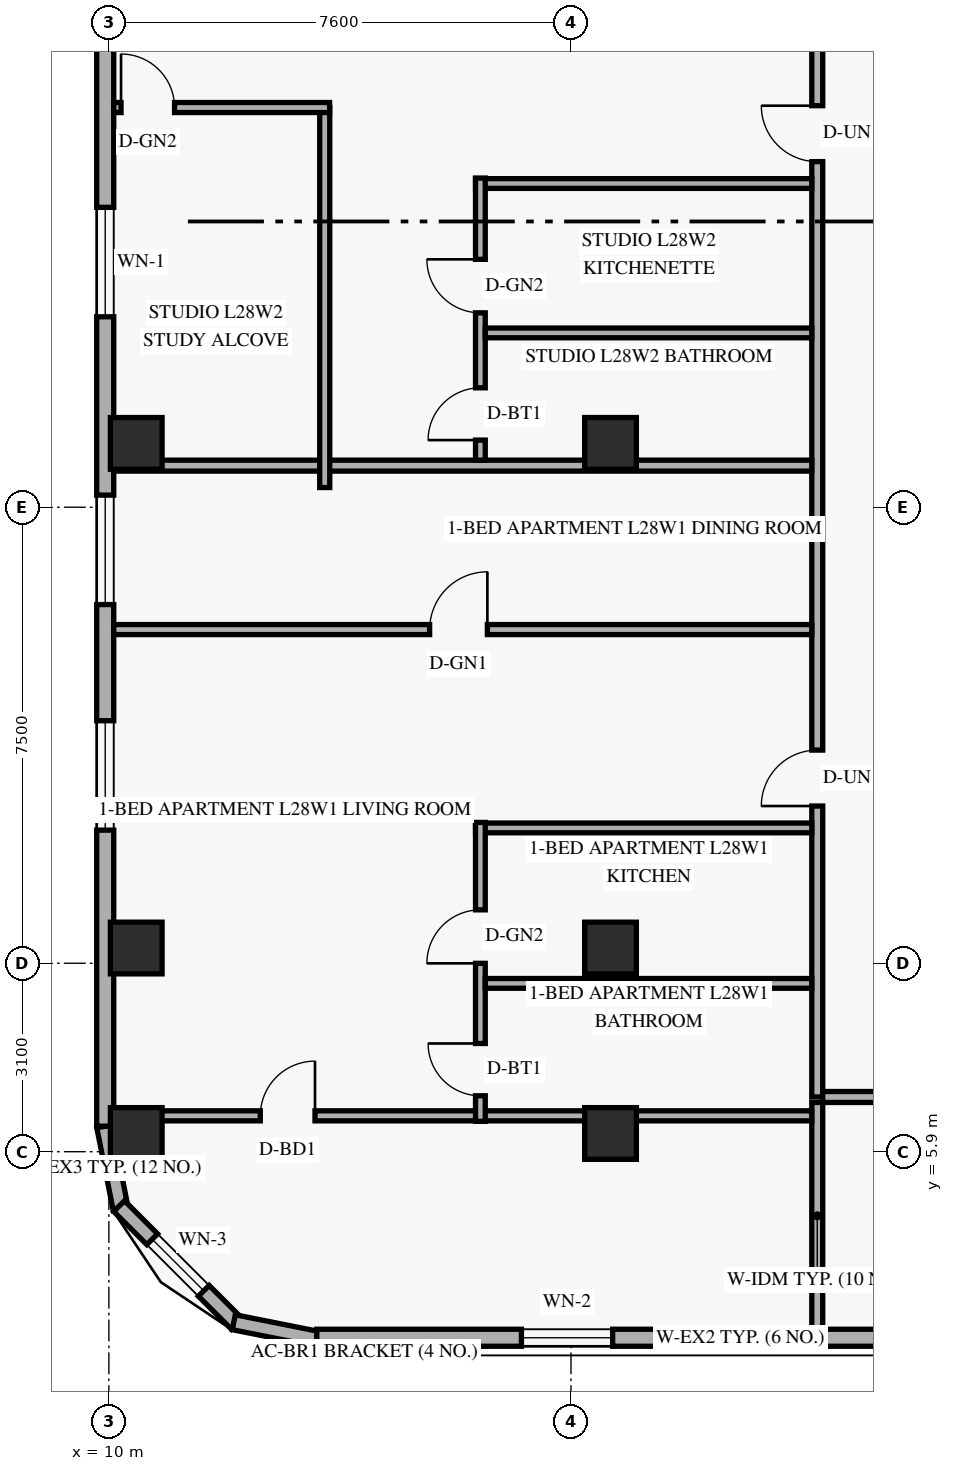
"""IFC4 building model, lengths in metres.
Left out: names, types, materials, properties, quantities, classifications, styles, units other than length and angle.
Written with IfcOpenShell. Run it as: python <this file> out.ifc"""

import sys

from ifc_helpers import new_model, si_unit, direction, frame, frame_2d, origin, origin_2d, place, context, subcontext, project, spatial, rectangle, extrude, element, fill, save


model = new_model("IFC4")
c1 = context("Model", 3, precision=1e-05, world=origin(), true_north=direction((0.0, 1.0)))
c2 = subcontext(c1, "Body", "Model", "MODEL_VIEW")
j1 = project(units=[si_unit("LENGTHUNIT", "METRE"), si_unit("PLANEANGLEUNIT", "RADIAN")], contexts=[c1])
p1 = place(None, origin())
s1 = spatial("IfcSite", under=j1, at=p1, CompositionType="ELEMENT")
p2 = place(p1, origin())
s2 = spatial("IfcBuilding", under=s1, at=p2, CompositionType="ELEMENT")
p3 = place(p2, frame((0.0, 0.0, 109.8)))
s3 = spatial("IfcBuildingStorey", under=s2, at=p3, CompositionType="ELEMENT", Elevation=109.8)
for number, where, z_axis, x_axis in (
    (1, (10.45, 6.2, 0.0), (0.0, 0.0, 1.0), (1.0, 0.0, 0.0)),
    (2, (10.45, 9.25, 0.0), (0.0, 0.0, 1.0), (1.0, 0.0, 0.0)),
    (3, (10.45, 17.55, 0.0), (0.0, 0.0, 1.0), (1.0, 0.0, 0.0)),
    (4, (18.25, 6.2, 0.0), (0.0, 0.0, 1.0), (1.0, 0.0, 0.0)),
    (5, (18.25, 9.25, 0.0), (0.0, 0.0, 1.0), (1.0, 0.0, 0.0)),
    (6, (18.25, 17.55, 0.0), (0.0, 0.0, 1.0), (1.0, 0.0, 0.0)),
):
    element("IfcColumn", number, at=place(p3, frame(where, z_axis=z_axis, x_axis=x_axis)), inside=s3, PredefinedType="COLUMN", context=c2, shape_type="SweptSolid", body=[
        extrude(rectangle(XDim=0.85, YDim=0.85, at=origin_2d()), origin(), (0.0, 0.0, 1.0), 3.6),
    ])
p4 = place(p3, frame((9.924, 6.316, 0.0), z_axis=(0.0, 0.0, 1.0), x_axis=(0.195000137217, -0.980803214965, 0.0)))
e7 = element("IfcWall", 7, at=p4, inside=s3, PredefinedType="SOLIDWALL", context=c2, shape_type="SweptSolid", body=[
    extrude(rectangle(XDim=1.388, YDim=0.25, at=frame_2d((0.694, 0.0))), origin(), (0.0, 0.0, 1.0), 3.36),
])
p5 = place(p3, frame((10.168, 5.005, 0.0), z_axis=(0.0, 0.0, 1.0), x_axis=(0.707151344399, -0.707062215165, 0.0)))
e8 = element("IfcWall", 8, at=p5, inside=s3, PredefinedType="SOLIDWALL", context=c2, shape_type="SweptSolid", body=[
    extrude(rectangle(XDim=2.739, YDim=0.25, at=frame_2d((1.37, 0.0))), origin(), (0.0, 0.0, 1.0), 3.36),
])
p6 = place(p5, frame((0.77, 0.0, 0.85)))
e9 = element("IfcOpeningElement", 9, at=p6, cuts=e8, PredefinedType="OPENING", context=c2, shape_type="SweptSolid", body=[
    extrude(rectangle(XDim=1.2, YDim=1.5, at=frame_2d((0.6, 0.75))), frame((0.0, 0.135, 0.0), z_axis=(0.0, -1.0, 0.0), x_axis=(1.0, 0.0, 0.0)), (0.0, 0.0, 1.0), 0.27),
])
p7 = place(p3, frame((12.054, 3.095, 0.0), z_axis=(0.0, 0.0, 1.0), x_axis=(0.980809899341, -0.19496651342, 0.0)))
e10 = element("IfcWall", 10, at=p7, inside=s3, PredefinedType="SOLIDWALL", context=c2, shape_type="SweptSolid", body=[
    extrude(rectangle(XDim=1.389, YDim=0.25, at=frame_2d((0.694, 0.0))), origin(), (0.0, 0.0, 1.0), 3.36),
])
p8 = place(p3, frame((13.42, 2.84, 0.0), z_axis=(0.0, 0.0, 1.0), x_axis=(1.0, 0.0, 0.0)))
e11 = element("IfcWall", 11, at=p8, inside=s3, PredefinedType="SOLIDWALL", context=c2, shape_type="SweptSolid", body=[
    extrude(rectangle(XDim=13.93, YDim=0.28, at=frame_2d((6.965, 0.0))), origin(), (0.0, 0.0, 1.0), 3.36),
])
p9 = place(p8, frame((3.365, 0.0, 0.85)))
e12 = element("IfcOpeningElement", 12, at=p9, cuts=e11, PredefinedType="OPENING", context=c2, shape_type="SweptSolid", body=[
    extrude(rectangle(XDim=1.5, YDim=1.55, at=frame_2d((0.75, 0.775))), frame((0.0, 0.15, 0.0), z_axis=(0.0, -1.0, 0.0), x_axis=(1.0, 0.0, 0.0)), (0.0, 0.0, 1.0), 0.3),
])
p10 = place(p8, frame((10.33, 0.0, 0.85)))
e13 = element("IfcOpeningElement", 13, at=p10, cuts=e11, PredefinedType="OPENING", context=c2, shape_type="SweptSolid", body=[
    extrude(rectangle(XDim=1.5, YDim=1.55, at=frame_2d((0.75, 0.775))), frame((0.0, 0.15, 0.0), z_axis=(0.0, -1.0, 0.0), x_axis=(1.0, 0.0, 0.0)), (0.0, 0.0, 1.0), 0.3),
])
p11 = place(p3, frame((9.94, 41.68, 0.0), z_axis=(0.0, 0.0, 1.0), x_axis=(0.0, -1.0, 0.0)))
e14 = element("IfcWall", 14, at=p11, inside=s3, PredefinedType="SOLIDWALL", context=c2, shape_type="SweptSolid", body=[
    extrude(rectangle(XDim=35.36, YDim=0.28, at=frame_2d((17.68, 0.0))), origin(), (0.0, 0.0, 1.0), 3.36),
])
p12 = place(p11, frame((28.691, 0.0, 0.85)))
e15 = element("IfcOpeningElement", 15, at=p12, cuts=e14, PredefinedType="OPENING", context=c2, shape_type="SweptSolid", body=[
    extrude(rectangle(XDim=1.8, YDim=1.6, at=frame_2d((0.9, 0.8))), frame((0.0, 0.15, 0.0), z_axis=(0.0, -1.0, 0.0), x_axis=(1.0, 0.0, 0.0)), (0.0, 0.0, 1.0), 0.3),
])
p13 = place(p11, frame((24.981, 0.0, 0.85)))
e16 = element("IfcOpeningElement", 16, at=p13, cuts=e14, PredefinedType="OPENING", context=c2, shape_type="SweptSolid", body=[
    extrude(rectangle(XDim=1.8, YDim=1.6, at=frame_2d((0.9, 0.8))), frame((0.0, 0.15, 0.0), z_axis=(0.0, -1.0, 0.0), x_axis=(1.0, 0.0, 0.0)), (0.0, 0.0, 1.0), 0.3),
])
p14 = place(p11, frame((20.248, 0.0, 0.85)))
e17 = element("IfcOpeningElement", 17, at=p14, cuts=e14, PredefinedType="OPENING", context=c2, shape_type="SweptSolid", body=[
    extrude(rectangle(XDim=1.8, YDim=1.6, at=frame_2d((0.9, 0.8))), frame((0.0, 0.15, 0.0), z_axis=(0.0, -1.0, 0.0), x_axis=(1.0, 0.0, 0.0)), (0.0, 0.0, 1.0), 0.3),
])
p15 = place(p11, frame((14.363, 0.0, 0.85)))
e18 = element("IfcOpeningElement", 18, at=p15, cuts=e14, PredefinedType="OPENING", context=c2, shape_type="SweptSolid", body=[
    extrude(rectangle(XDim=1.8, YDim=1.6, at=frame_2d((0.9, 0.8))), frame((0.0, 0.15, 0.0), z_axis=(0.0, -1.0, 0.0), x_axis=(1.0, 0.0, 0.0)), (0.0, 0.0, 1.0), 0.3),
])
p16 = place(p11, frame((7.867, 0.0, 0.85)))
e19 = element("IfcOpeningElement", 19, at=p16, cuts=e14, PredefinedType="OPENING", context=c2, shape_type="SweptSolid", body=[
    extrude(rectangle(XDim=1.8, YDim=1.6, at=frame_2d((0.9, 0.8))), frame((0.0, 0.15, 0.0), z_axis=(0.0, -1.0, 0.0), x_axis=(1.0, 0.0, 0.0)), (0.0, 0.0, 1.0), 0.3),
])
p17 = place(p11, frame((4.546, 0.0, 0.85)))
e20 = element("IfcOpeningElement", 20, at=p17, cuts=e14, PredefinedType="OPENING", context=c2, shape_type="SweptSolid", body=[
    extrude(rectangle(XDim=1.8, YDim=1.6, at=frame_2d((0.9, 0.8))), frame((0.0, 0.15, 0.0), z_axis=(0.0, -1.0, 0.0), x_axis=(1.0, 0.0, 0.0)), (0.0, 0.0, 1.0), 0.3),
])
p18 = place(p3, frame((21.65, 6.8, 0.0), z_axis=(0.0, 0.0, 1.0), x_axis=(0.0, 1.0, 0.0)))
e21 = element("IfcWall", 21, at=p18, inside=s3, PredefinedType="STANDARD", context=c2, shape_type="SweptSolid", body=[
    extrude(rectangle(XDim=34.4, YDim=0.18, at=frame_2d((17.2, 0.0))), origin(), (0.0, 0.0, 1.0), 2.731),
])
p19 = place(p18, frame((4.785, 0.0, 0.0)))
e22 = element("IfcOpeningElement", 22, at=p19, cuts=e21, PredefinedType="OPENING", context=c2, shape_type="SweptSolid", body=[
    extrude(rectangle(XDim=0.92, YDim=2.15, at=frame_2d((0.46, 1.075))), frame((0.0, 0.1, 0.0), z_axis=(0.0, -1.0, 0.0), x_axis=(1.0, 0.0, 0.0)), (0.0, 0.0, 1.0), 0.2),
])
p20 = place(p18, frame((15.384, 0.0, 0.0)))
e23 = element("IfcOpeningElement", 23, at=p20, cuts=e21, PredefinedType="OPENING", context=c2, shape_type="SweptSolid", body=[
    extrude(rectangle(XDim=0.92, YDim=2.15, at=frame_2d((0.46, 1.075))), frame((0.0, 0.1, 0.0), z_axis=(0.0, -1.0, 0.0), x_axis=(1.0, 0.0, 0.0)), (0.0, 0.0, 1.0), 0.2),
])
p21 = place(p18, frame((28.41, 0.0, 0.0)))
e24 = element("IfcOpeningElement", 24, at=p21, cuts=e21, PredefinedType="OPENING", context=c2, shape_type="SweptSolid", body=[
    extrude(rectangle(XDim=0.92, YDim=2.15, at=frame_2d((0.46, 1.075))), frame((0.0, 0.1, 0.0), z_axis=(0.0, -1.0, 0.0), x_axis=(1.0, 0.0, 0.0)), (0.0, 0.0, 1.0), 0.2),
])
p22 = place(p3, frame((21.74, 6.8, 0.0), z_axis=(0.0, 0.0, 1.0), x_axis=(1.0, 0.0, 0.0)))
e25 = element("IfcWall", 25, at=p22, inside=s3, PredefinedType="STANDARD", context=c2, shape_type="SweptSolid", body=[
    extrude(rectangle(XDim=13.68, YDim=0.18, at=frame_2d((6.84, 0.0))), origin(), (0.0, 0.0, 1.0), 2.731),
])
p23 = place(p22, frame((0.97, 0.0, 0.0)))
e26 = element("IfcOpeningElement", 26, at=p23, cuts=e25, PredefinedType="OPENING", context=c2, shape_type="SweptSolid", body=[
    extrude(rectangle(XDim=0.95, YDim=2.15, at=frame_2d((0.475, 1.075))), frame((0.0, 0.1, 0.0), z_axis=(0.0, -1.0, 0.0), x_axis=(1.0, 0.0, 0.0)), (0.0, 0.0, 1.0), 0.2),
])
p24 = place(p22, frame((9.11, 0.0, 0.0)))
e27 = element("IfcOpeningElement", 27, at=p24, cuts=e25, PredefinedType="OPENING", context=c2, shape_type="SweptSolid", body=[
    extrude(rectangle(XDim=0.95, YDim=2.15, at=frame_2d((0.475, 1.075))), frame((0.0, 0.1, 0.0), z_axis=(0.0, -1.0, 0.0), x_axis=(1.0, 0.0, 0.0)), (0.0, 0.0, 1.0), 0.2),
])
p25 = place(p3, frame((21.65, 2.98, 0.0), z_axis=(0.0, 0.0, 1.0), x_axis=(0.0, 1.0, 0.0)))
e28 = element("IfcWall", 28, at=p25, inside=s3, PredefinedType="PARTITIONING", context=c2, shape_type="SweptSolid", body=[
    extrude(rectangle(XDim=3.73, YDim=0.18, at=frame_2d((1.865, 0.0))), origin(), (0.0, 0.0, 1.0), 2.809),
])
p26 = place(p3, frame((10.08, 6.49, 0.0), z_axis=(0.0, 0.0, 1.0), x_axis=(1.0, 0.0, 0.0)))
e29 = element("IfcWall", 29, at=p26, inside=s3, PredefinedType="PARTITIONING", context=c2, shape_type="SweptSolid", body=[
    extrude(rectangle(XDim=11.48, YDim=0.165, at=frame_2d((5.74, 0.0))), origin(), (0.0, 0.0, 1.0), 3.36),
])
p27 = place(p26, frame((2.41, 0.0, 0.0)))
e30 = element("IfcOpeningElement", 30, at=p27, cuts=e29, PredefinedType="OPENING", context=c2, shape_type="SweptSolid", body=[
    extrude(rectangle(XDim=0.9, YDim=2.14, at=frame_2d((0.45, 1.07))), frame((0.0, 0.093, 0.0), z_axis=(0.0, -1.0, 0.0), x_axis=(1.0, 0.0, 0.0)), (0.0, 0.0, 1.0), 0.185),
])
p28 = place(p3, frame((16.03, 11.226, 0.0), z_axis=(0.0, 0.0, 1.0), x_axis=(1.0, 0.0, 0.0)))
e31 = element("IfcWall", 31, at=p28, inside=s3, PredefinedType="PLUMBINGWALL", context=c2, shape_type="SweptSolid", body=[
    extrude(rectangle(XDim=5.53, YDim=0.16, at=frame_2d((2.765, 0.0))), origin(), (0.0, 0.0, 1.0), 2.731),
])
p29 = place(p3, frame((16.11, 6.4, 0.0), z_axis=(0.0, 0.0, 1.0), x_axis=(0.0, 1.0, 0.0)))
e32 = element("IfcWall", 32, at=p29, inside=s3, PredefinedType="PLUMBINGWALL", context=c2, shape_type="SweptSolid", body=[
    extrude(rectangle(XDim=4.916, YDim=0.16, at=frame_2d((2.458, 0.0))), origin(), (0.0, 0.0, 1.0), 2.731),
])
p30 = place(p29, frame((0.42, 0.0, 0.0)))
e33 = element("IfcOpeningElement", 33, at=p30, cuts=e32, PredefinedType="OPENING", context=c2, shape_type="SweptSolid", body=[
    extrude(rectangle(XDim=0.86, YDim=2.12, at=frame_2d((0.43, 1.06))), frame((0.0, 0.09, 0.0), z_axis=(0.0, -1.0, 0.0), x_axis=(1.0, 0.0, 0.0)), (0.0, 0.0, 1.0), 0.18),
])
p31 = place(p29, frame((2.598, 0.0, 0.0)))
e34 = element("IfcOpeningElement", 34, at=p31, cuts=e32, PredefinedType="OPENING", context=c2, shape_type="SweptSolid", body=[
    extrude(rectangle(XDim=0.88, YDim=2.12, at=frame_2d((0.44, 1.06))), frame((0.0, 0.09, 0.0), z_axis=(0.0, -1.0, 0.0), x_axis=(1.0, 0.0, 0.0)), (0.0, 0.0, 1.0), 0.18),
])
p32 = place(p3, frame((16.19, 8.668, 0.0), z_axis=(0.0, 0.0, 1.0), x_axis=(1.0, 0.0, 0.0)))
e35 = element("IfcWall", 35, at=p32, inside=s3, PredefinedType="PLUMBINGWALL", context=c2, shape_type="SweptSolid", body=[
    extrude(rectangle(XDim=5.37, YDim=0.16, at=frame_2d((2.685, 0.0))), origin(), (0.0, 0.0, 1.0), 2.731),
])
p33 = place(p3, frame((10.08, 14.488, 0.0), z_axis=(0.0, 0.0, 1.0), x_axis=(1.0, 0.0, 0.0)))
e36 = element("IfcWall", 36, at=p33, inside=s3, PredefinedType="PARTITIONING", context=c2, shape_type="SweptSolid", body=[
    extrude(rectangle(XDim=11.48, YDim=0.165, at=frame_2d((5.74, 0.0))), origin(), (0.0, 0.0, 1.0), 2.731),
])
p34 = place(p33, frame((5.195, 0.0, 0.0)))
e37 = element("IfcOpeningElement", 37, at=p34, cuts=e36, PredefinedType="OPENING", context=c2, shape_type="SweptSolid", body=[
    extrude(rectangle(XDim=0.95, YDim=2.15, at=frame_2d((0.475, 1.075))), frame((0.0, 0.093, 0.0), z_axis=(0.0, -1.0, 0.0), x_axis=(1.0, 0.0, 0.0)), (0.0, 0.0, 1.0), 0.185),
])
p35 = place(p3, frame((10.08, 17.184, 0.0), z_axis=(0.0, 0.0, 1.0), x_axis=(1.0, 0.0, 0.0)))
e38 = element("IfcWall", 38, at=p35, inside=s3, PredefinedType="PARTITIONING", context=c2, shape_type="SweptSolid", body=[
    extrude(rectangle(XDim=11.48, YDim=0.18, at=frame_2d((5.74, 0.0))), origin(), (0.0, 0.0, 1.0), 2.731),
])
p36 = place(p3, frame((16.03, 21.824, 0.0), z_axis=(0.0, 0.0, 1.0), x_axis=(1.0, 0.0, 0.0)))
e39 = element("IfcWall", 39, at=p36, inside=s3, PredefinedType="PLUMBINGWALL", context=c2, shape_type="SweptSolid", body=[
    extrude(rectangle(XDim=5.53, YDim=0.16, at=frame_2d((2.765, 0.0))), origin(), (0.0, 0.0, 1.0), 2.731),
])
p37 = place(p3, frame((16.11, 17.274, 0.0), z_axis=(0.0, 0.0, 1.0), x_axis=(0.0, 1.0, 0.0)))
e40 = element("IfcWall", 40, at=p37, inside=s3, PredefinedType="PLUMBINGWALL", context=c2, shape_type="SweptSolid", body=[
    extrude(rectangle(XDim=4.64, YDim=0.16, at=frame_2d((2.32, 0.0))), origin(), (0.0, 0.0, 1.0), 2.731),
])
p38 = place(p37, frame((0.33, 0.0, 0.0)))
e41 = element("IfcOpeningElement", 41, at=p38, cuts=e40, PredefinedType="OPENING", context=c2, shape_type="SweptSolid", body=[
    extrude(rectangle(XDim=0.86, YDim=2.12, at=frame_2d((0.43, 1.06))), frame((0.0, 0.09, 0.0), z_axis=(0.0, -1.0, 0.0), x_axis=(1.0, 0.0, 0.0)), (0.0, 0.0, 1.0), 0.18),
])
p39 = place(p37, frame((2.423, 0.0, 0.0)))
e42 = element("IfcOpeningElement", 42, at=p39, cuts=e40, PredefinedType="OPENING", context=c2, shape_type="SweptSolid", body=[
    extrude(rectangle(XDim=0.88, YDim=2.12, at=frame_2d((0.44, 1.06))), frame((0.0, 0.09, 0.0), z_axis=(0.0, -1.0, 0.0), x_axis=(1.0, 0.0, 0.0)), (0.0, 0.0, 1.0), 0.18),
])
p40 = place(p3, frame((16.19, 19.367, 0.0), z_axis=(0.0, 0.0, 1.0), x_axis=(1.0, 0.0, 0.0)))
e43 = element("IfcWall", 43, at=p40, inside=s3, PredefinedType="PLUMBINGWALL", context=c2, shape_type="SweptSolid", body=[
    extrude(rectangle(XDim=5.37, YDim=0.16, at=frame_2d((2.685, 0.0))), origin(), (0.0, 0.0, 1.0), 2.731),
])
p41 = place(p3, frame((13.55, 16.824, 0.0), z_axis=(0.0, 0.0, 1.0), x_axis=(0.0, 1.0, 0.0)))
e44 = element("IfcWall", 44, at=p41, inside=s3, PredefinedType="PARTITIONING", context=c2, shape_type="SweptSolid", body=[
    extrude(rectangle(XDim=6.25, YDim=0.165, at=frame_2d((3.125, 0.0))), origin(), (0.0, 0.0, 1.0), 2.731),
])
p42 = place(p3, frame((10.08, 23.074, 0.0), z_axis=(0.0, 0.0, 1.0), x_axis=(1.0, 0.0, 0.0)))
e45 = element("IfcWall", 45, at=p42, inside=s3, PredefinedType="PARTITIONING", context=c2, shape_type="SweptSolid", body=[
    extrude(rectangle(XDim=3.55, YDim=0.165, at=frame_2d((1.775, 0.0))), origin(), (0.0, 0.0, 1.0), 2.809),
])
p43 = place(p42, frame((0.12, 0.0, 0.0)))
e46 = element("IfcOpeningElement", 46, at=p43, cuts=e45, PredefinedType="OPENING", context=c2, shape_type="SweptSolid", body=[
    extrude(rectangle(XDim=0.88, YDim=2.12, at=frame_2d((0.44, 1.06))), frame((0.0, 0.093, 0.0), z_axis=(0.0, -1.0, 0.0), x_axis=(1.0, 0.0, 0.0)), (0.0, 0.0, 1.0), 0.185),
])
p44 = place(p6, origin())
e47 = element("IfcWindow", 47, at=p44, inside=s3, PartitioningType="SINGLE_PANEL", PredefinedType="WINDOW", context=c2, shape_type="SweptSolid", body=[
    extrude(rectangle(XDim=1.2, YDim=1.5, at=frame_2d((0.6, 0.75))), frame((0.0, 0.03, 0.0), z_axis=(0.0, -1.0, 0.0), x_axis=(1.0, 0.0, 0.0)), (0.0, 0.0, 1.0), 0.06),
])
fill(e9, e47)
p45 = place(p9, origin())
e48 = element("IfcWindow", 48, at=p45, inside=s3, PartitioningType="SINGLE_PANEL", PredefinedType="WINDOW", context=c2, shape_type="SweptSolid", body=[
    extrude(rectangle(XDim=1.5, YDim=1.55, at=frame_2d((0.75, 0.775))), frame((0.0, 0.03, 0.0), z_axis=(0.0, -1.0, 0.0), x_axis=(1.0, 0.0, 0.0)), (0.0, 0.0, 1.0), 0.06),
])
fill(e12, e48)
p46 = place(p12, origin())
e49 = element("IfcWindow", 49, at=p46, inside=s3, PartitioningType="SINGLE_PANEL", PredefinedType="WINDOW", context=c2, shape_type="SweptSolid", body=[
    extrude(rectangle(XDim=1.8, YDim=1.6, at=frame_2d((0.9, 0.8))), frame((0.0, 0.03, 0.0), z_axis=(0.0, -1.0, 0.0), x_axis=(1.0, 0.0, 0.0)), (0.0, 0.0, 1.0), 0.06),
])
fill(e15, e49)
p47 = place(p13, origin())
e50 = element("IfcWindow", 50, at=p47, inside=s3, PartitioningType="SINGLE_PANEL", PredefinedType="WINDOW", context=c2, shape_type="SweptSolid", body=[
    extrude(rectangle(XDim=1.8, YDim=1.6, at=frame_2d((0.9, 0.8))), frame((0.0, 0.03, 0.0), z_axis=(0.0, -1.0, 0.0), x_axis=(1.0, 0.0, 0.0)), (0.0, 0.0, 1.0), 0.06),
])
fill(e16, e50)
p48 = place(p14, origin())
e51 = element("IfcWindow", 51, at=p48, inside=s3, PartitioningType="SINGLE_PANEL", PredefinedType="WINDOW", context=c2, shape_type="SweptSolid", body=[
    extrude(rectangle(XDim=1.8, YDim=1.6, at=frame_2d((0.9, 0.8))), frame((0.0, 0.03, 0.0), z_axis=(0.0, -1.0, 0.0), x_axis=(1.0, 0.0, 0.0)), (0.0, 0.0, 1.0), 0.06),
])
fill(e17, e51)
p49 = place(p34, origin())
e52 = element("IfcDoor", 52, at=p49, inside=s3, OperationType="SINGLE_SWING_RIGHT", PredefinedType="DOOR", context=c2, shape_type="SweptSolid", body=[
    extrude(rectangle(XDim=0.95, YDim=2.15, at=frame_2d((0.475, 1.075))), frame((0.0, 0.025, 0.0), z_axis=(0.0, -1.0, 0.0), x_axis=(1.0, 0.0, 0.0)), (0.0, 0.0, 1.0), 0.05),
])
fill(e37, e52)
p50 = place(p19, origin())
e53 = element("IfcDoor", 53, at=p50, inside=s3, OperationType="SINGLE_SWING_LEFT", PredefinedType="DOOR", context=c2, shape_type="SweptSolid", body=[
    extrude(rectangle(XDim=0.92, YDim=2.15, at=frame_2d((0.46, 1.075))), frame((0.0, 0.025, 0.0), z_axis=(0.0, -1.0, 0.0), x_axis=(1.0, 0.0, 0.0)), (0.0, 0.0, 1.0), 0.05),
])
fill(e22, e53)
p51 = place(p30, origin())
e54 = element("IfcDoor", 54, at=p51, inside=s3, OperationType="SINGLE_SWING_RIGHT", PredefinedType="DOOR", context=c2, shape_type="SweptSolid", body=[
    extrude(rectangle(XDim=0.86, YDim=2.12, at=frame_2d((0.43, 1.06))), frame((0.0, 0.025, 0.0), z_axis=(0.0, -1.0, 0.0), x_axis=(1.0, 0.0, 0.0)), (0.0, 0.0, 1.0), 0.05),
])
fill(e33, e54)
p52 = place(p31, origin())
e55 = element("IfcDoor", 55, at=p52, inside=s3, OperationType="SINGLE_SWING_LEFT", PredefinedType="DOOR", context=c2, shape_type="SweptSolid", body=[
    extrude(rectangle(XDim=0.88, YDim=2.12, at=frame_2d((0.44, 1.06))), frame((0.0, 0.025, 0.0), z_axis=(0.0, -1.0, 0.0), x_axis=(1.0, 0.0, 0.0)), (0.0, 0.0, 1.0), 0.05),
])
fill(e34, e55)
p53 = place(p27, origin())
e56 = element("IfcDoor", 56, at=p53, inside=s3, OperationType="SINGLE_SWING_RIGHT", PredefinedType="DOOR", context=c2, shape_type="SweptSolid", body=[
    extrude(rectangle(XDim=0.9, YDim=2.14, at=frame_2d((0.45, 1.07))), frame((0.0, 0.025, 0.0), z_axis=(0.0, -1.0, 0.0), x_axis=(1.0, 0.0, 0.0)), (0.0, 0.0, 1.0), 0.05),
])
fill(e30, e56)
p54 = place(p43, origin())
e57 = element("IfcDoor", 57, at=p54, inside=s3, OperationType="SINGLE_SWING_LEFT", PredefinedType="DOOR", context=c2, shape_type="SweptSolid", body=[
    extrude(rectangle(XDim=0.88, YDim=2.12, at=frame_2d((0.44, 1.06))), frame((0.0, 0.025, 0.0), z_axis=(0.0, -1.0, 0.0), x_axis=(1.0, 0.0, 0.0)), (0.0, 0.0, 1.0), 0.05),
])
fill(e46, e57)
p55 = place(p20, origin())
e58 = element("IfcDoor", 58, at=p55, inside=s3, OperationType="SINGLE_SWING_RIGHT", PredefinedType="DOOR", context=c2, shape_type="SweptSolid", body=[
    extrude(rectangle(XDim=0.92, YDim=2.15, at=frame_2d((0.46, 1.075))), frame((0.0, 0.025, 0.0), z_axis=(0.0, -1.0, 0.0), x_axis=(1.0, 0.0, 0.0)), (0.0, 0.0, 1.0), 0.05),
])
fill(e23, e58)
p56 = place(p38, origin())
e59 = element("IfcDoor", 59, at=p56, inside=s3, OperationType="SINGLE_SWING_LEFT", PredefinedType="DOOR", context=c2, shape_type="SweptSolid", body=[
    extrude(rectangle(XDim=0.86, YDim=2.12, at=frame_2d((0.43, 1.06))), frame((0.0, 0.025, 0.0), z_axis=(0.0, -1.0, 0.0), x_axis=(1.0, 0.0, 0.0)), (0.0, 0.0, 1.0), 0.05),
])
fill(e41, e59)
p57 = place(p39, origin())
e60 = element("IfcDoor", 60, at=p57, inside=s3, OperationType="SINGLE_SWING_RIGHT", PredefinedType="DOOR", context=c2, shape_type="SweptSolid", body=[
    extrude(rectangle(XDim=0.88, YDim=2.12, at=frame_2d((0.44, 1.06))), frame((0.0, 0.025, 0.0), z_axis=(0.0, -1.0, 0.0), x_axis=(1.0, 0.0, 0.0)), (0.0, 0.0, 1.0), 0.05),
])
fill(e42, e60)
save(model, sys.argv[1])
